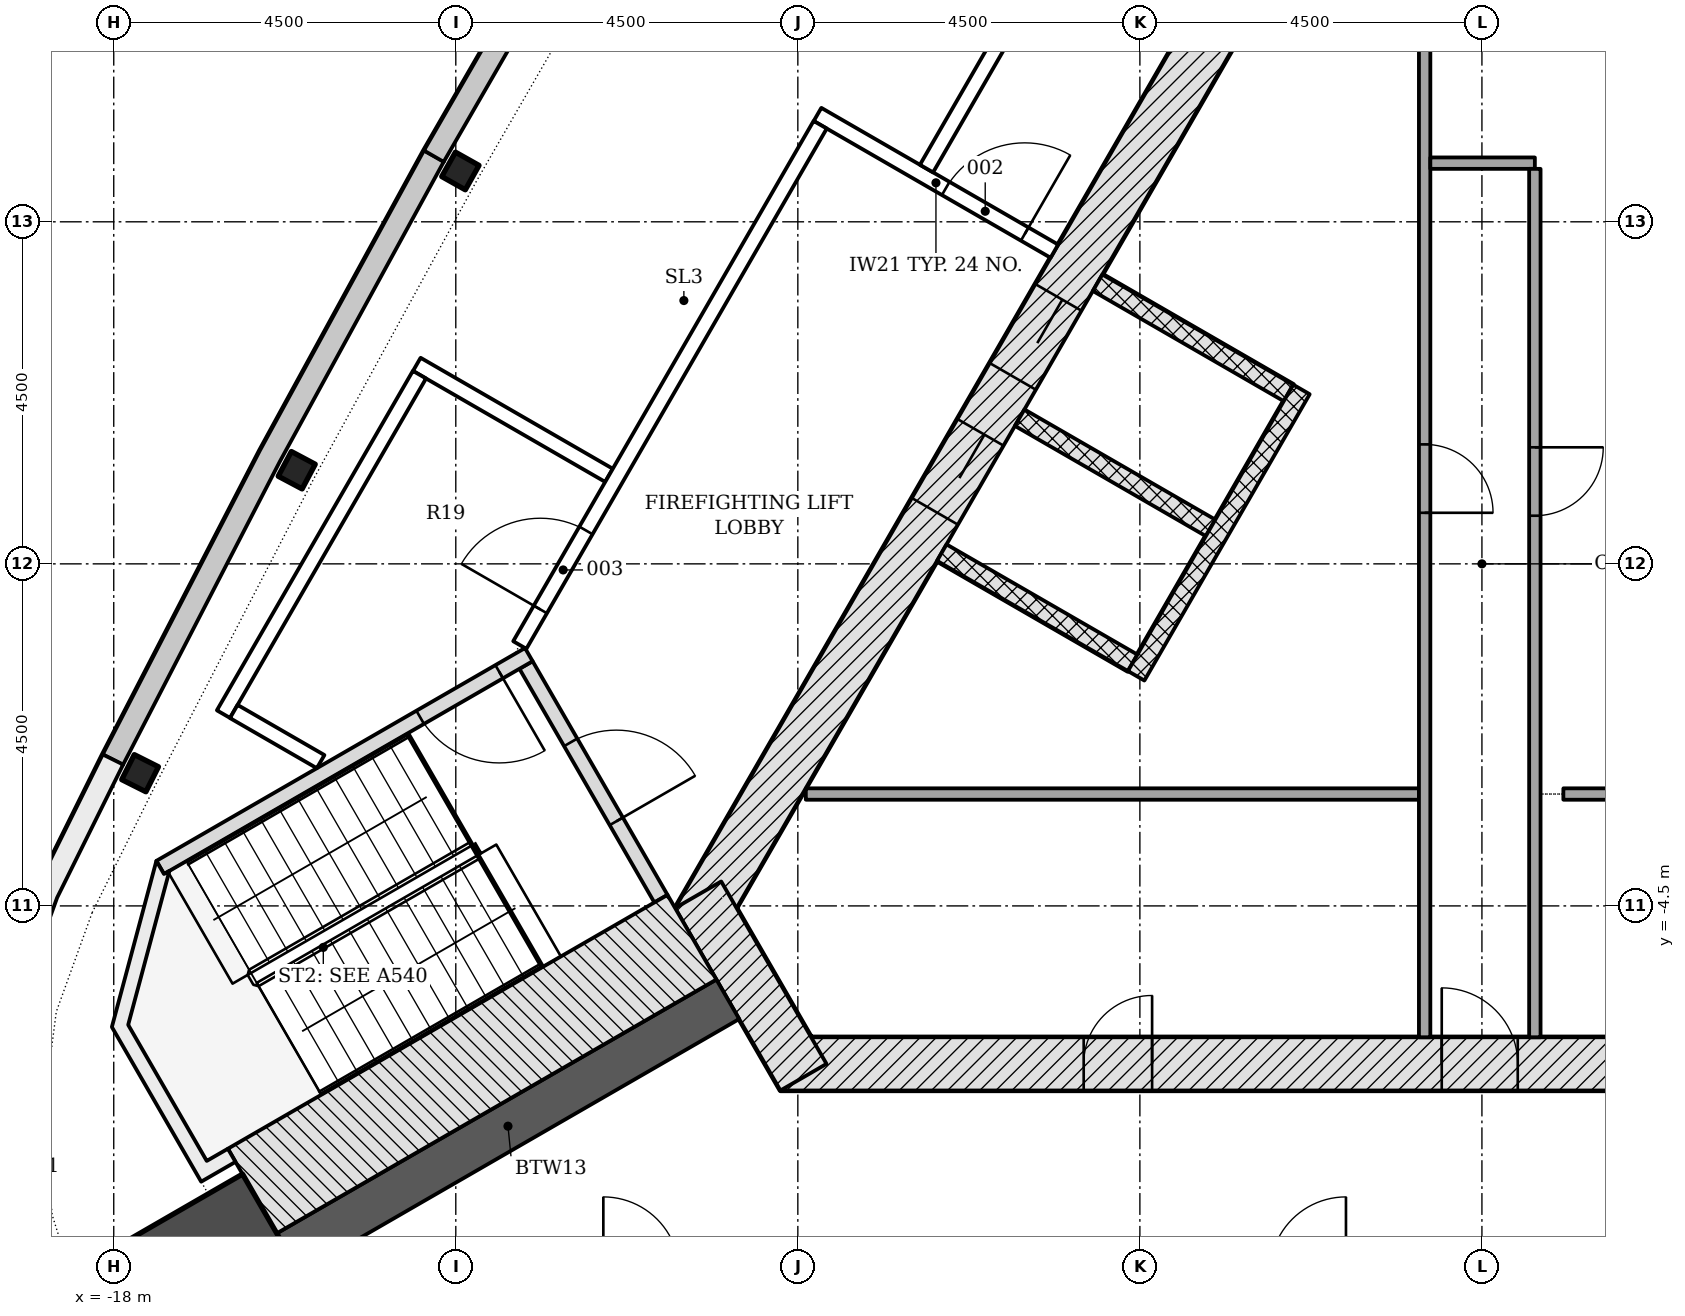
"""IFC4 building model, lengths in metres.
Left out: names, types, materials, properties, quantities, classifications, styles, units other than length and angle.
Written with IfcOpenShell. Run it as: python <this file> out.ifc"""

import sys

from ifc_helpers import new_model, si_unit, direction, frame, frame_2d, origin, origin_2d, place, context, subcontext, project, spatial, polyline, rectangle, i_section, outline, extrude, element, fill, save


model = new_model("IFC4")
c1 = context("Model", 3, precision=1e-05, world=origin(), true_north=direction((0.0, 1.0)))
c2 = subcontext(c1, "Body", "Model", "MODEL_VIEW")
j1 = project(units=[si_unit("LENGTHUNIT", "METRE"), si_unit("PLANEANGLEUNIT", "RADIAN")], contexts=[c1])
p1 = place(None, origin())
s1 = spatial("IfcSite", under=j1, at=p1, CompositionType="ELEMENT")
p2 = place(p1, origin())
s2 = spatial("IfcBuilding", under=s1, at=p2, CompositionType="ELEMENT")
p3 = place(p2, frame((0.0, 0.0, 288.6)))
s3 = spatial("IfcBuildingStorey", under=s2, at=p3, CompositionType="ELEMENT", Elevation=288.6)
p4 = place(p3, frame((-9.229, -6.578, -0.25), z_axis=(0.0, 0.0, 1.0), x_axis=(1.0, 0.0, 0.0)))
e1 = element("IfcWall", 1, at=p4, inside=s3, PredefinedType="SHEAR", context=c2, shape_type="SweptSolid", body=[
    extrude(rectangle(XDim=18.458, YDim=0.7, at=frame_2d((9.229, 0.0))), origin(), (0.0, 0.0, 1.0), 4.5),
])
p5 = place(p4, frame((8.7, 0.0, 0.25)))
e2 = element("IfcOpeningElement", 2, at=p5, cuts=e1, PredefinedType="OPENING", context=c2, shape_type="SweptSolid", body=[
    extrude(rectangle(XDim=1.0, YDim=2.1, at=frame_2d((0.5, 1.05))), frame((0.0, 0.36, 0.0), z_axis=(0.0, -1.0, 0.0), x_axis=(1.0, 0.0, 0.0)), (0.0, 0.0, 1.0), 0.72),
])
p6 = place(p4, frame((3.99, 0.0, 0.25)))
e3 = element("IfcOpeningElement", 3, at=p6, cuts=e1, PredefinedType="OPENING", context=c2, shape_type="SweptSolid", body=[
    extrude(rectangle(XDim=0.9, YDim=2.1, at=frame_2d((0.45, 1.05))), frame((0.0, 0.36, 0.0), z_axis=(0.0, -1.0, 0.0), x_axis=(1.0, 0.0, 0.0)), (0.0, 0.0, 1.0), 0.72),
])
p7 = place(p4, frame((13.539, 0.0, 0.25)))
e4 = element("IfcOpeningElement", 4, at=p7, cuts=e1, PredefinedType="OPENING", context=c2, shape_type="SweptSolid", body=[
    extrude(rectangle(XDim=0.9, YDim=2.1, at=frame_2d((0.45, 1.05))), frame((0.0, 0.36, 0.0), z_axis=(0.0, -1.0, 0.0), x_axis=(1.0, 0.0, 0.0)), (0.0, 0.0, 1.0), 0.72),
])
p8 = place(p3, frame((10.311, -4.703, -0.25), z_axis=(0.0, 0.0, 1.0), x_axis=(-0.500001446645, 0.866024568562, 0.0)))
e5 = element("IfcWall", 5, at=p8, inside=s3, PredefinedType="SHEAR", context=c2, shape_type="SweptSolid", body=[
    extrude(rectangle(XDim=18.458, YDim=0.7, at=frame_2d((9.229, 0.0))), origin(), (0.0, 0.0, 1.0), 4.5),
])
p9 = place(p3, frame((-1.083, 11.281, -0.25), z_axis=(0.0, 0.0, 1.0), x_axis=(-0.500001446645, -0.866024568562, 0.0)))
e6 = element("IfcWall", 6, at=p9, inside=s3, PredefinedType="SHEAR", context=c2, shape_type="SweptSolid", body=[
    extrude(rectangle(XDim=18.458, YDim=0.7, at=frame_2d((9.229, 0.0))), origin(), (0.0, 0.0, 1.0), 4.5),
])
p10 = place(p9, frame((8.979, 0.0, 0.25)))
e7 = element("IfcOpeningElement", 7, at=p10, cuts=e6, PredefinedType="OPENING", context=c2, shape_type="SweptSolid", body=[
    extrude(rectangle(XDim=1.2, YDim=2.1, at=frame_2d((0.6, 1.05))), frame((0.0, 0.36, 0.0), z_axis=(0.0, -1.0, 0.0), x_axis=(1.0, 0.0, 0.0)), (0.0, 0.0, 1.0), 0.72),
])
p11 = place(p9, frame((11.029, 0.0, 0.25)))
e8 = element("IfcOpeningElement", 8, at=p11, cuts=e6, PredefinedType="OPENING", context=c2, shape_type="SweptSolid", body=[
    extrude(rectangle(XDim=1.2, YDim=2.1, at=frame_2d((0.6, 1.05))), frame((0.0, 0.36, 0.0), z_axis=(0.0, -1.0, 0.0), x_axis=(1.0, 0.0, 0.0)), (0.0, 0.0, 1.0), 0.72),
])
p12 = place(p3, frame((-10.311, -4.353, -0.25), z_axis=(0.0, 0.0, 1.0), x_axis=(0.500042739161, -0.866000726912, 0.0)))
e9 = element("IfcWall", 9, at=p12, inside=s3, PredefinedType="SHEAR", context=c2, shape_type="SweptSolid", body=[
    extrude(rectangle(XDim=2.771, YDim=0.7, at=frame_2d((1.386, 0.0))), origin(), (0.0, 0.0, 1.0), 4.5),
])
p13 = place(p3, frame((-9.922, -5.728, -0.25), z_axis=(0.0, 0.0, 1.0), x_axis=(-0.866032176823, -0.499988268569, 0.0)))
e10 = element("IfcWall", 10, at=p13, inside=s3, PredefinedType="SHEAR", context=c2, shape_type="SweptSolid", body=[
    extrude(rectangle(XDim=6.678, YDim=0.6, at=frame_2d((3.339, 0.0))), origin(), (0.0, 0.0, 1.0), 4.5),
])
p14 = place(p3, frame((-16.745, -9.667, -0.25), z_axis=(0.0, 0.0, 1.0), x_axis=(-0.866025403784, -0.5, 0.0)))
e11 = element("IfcColumn", 11, at=p14, inside=s3, PredefinedType="COLUMN", context=c2, shape_type="SweptSolid", body=[
    extrude(rectangle(XDim=2.4, YDim=2.4, at=origin_2d()), origin(), (0.0, 0.0, 1.0), 4.5),
])
for number, where, z_axis, x_axis in (
    (12, (-13.44, 5.169, -0.25), (0.0, 0.0, 1.0), (-0.49, -0.872, 0.0)),
    (13, (-15.593, 1.232, -0.25), (0.0, 0.0, 1.0), (-0.47, -0.883, 0.0)),
    (14, (-17.654, -2.754, -0.25), (0.0, 0.0, 1.0), (-0.449, -0.894, 0.0)),
):
    element("IfcColumn", number, at=place(p3, frame(where, z_axis=z_axis, x_axis=x_axis)), inside=s3, PredefinedType="COLUMN", context=c2, shape_type="SweptSolid", body=[
        extrude(i_section(OverallWidth=0.368, OverallDepth=0.356, WebThickness=0.011, FlangeThickness=0.018, FilletRadius=0.015, at=origin_2d()), origin(), (0.0, 0.0, 1.0), 4.5),
    ])
p15 = place(p3, origin())
e15 = element("IfcWall", 15, at=p15, inside=s3, PredefinedType="NOTDEFINED", context=c2, shape_type="SweptSolid", body=[
    extrude(outline(polyline([(-13.919, 5.438), (-16.078, 1.49), (-18.145, -2.507), (-17.878, -2.645), (-15.813, 1.349), (-13.656, 5.294), (-13.919, 5.438)])), origin(), (0.0, 0.0, 1.0), 4.25),
])
p16 = place(p3, origin())
e16 = element("IfcWall", 16, at=p16, inside=s3, PredefinedType="NOTDEFINED", context=c2, shape_type="SweptSolid", body=[
    extrude(outline(polyline([(-11.669, 9.335), (-13.919, 5.438), (-13.659, 5.288), (-11.409, 9.185), (-11.669, 9.335)])), origin(), (0.0, 0.0, 1.0), 1.2),
])
p17 = place(p3, origin())
e17 = element("IfcWall", 17, at=p17, inside=s3, PredefinedType="NOTDEFINED", context=c2, shape_type="SweptSolid", body=[
    extrude(outline(polyline([(-18.145, -2.507), (-19.021, -4.273), (-19.538, -5.703), (-19.733, -7.21), (-19.599, -8.724), (-19.141, -10.174), (-18.381, -11.49), (-17.355, -12.611), (-16.111, -13.485), (-14.708, -14.069), (-13.211, -14.336), (-11.244, -14.46), (-11.225, -14.161), (-13.176, -14.038), (-14.623, -13.779), (-15.965, -13.22), (-17.156, -12.385), (-18.138, -11.312), (-18.865, -10.052), (-19.303, -8.665), (-19.432, -7.216), (-19.244, -5.774), (-18.745, -4.391), (-17.876, -2.64), (-18.145, -2.507)])), origin(), (0.0, 0.0, 1.0), 4.25),
])
for number, where, z_axis, x_axis in (
    (18, (-5.056, 3.699, -0.25), (0.0, 0.0, 1.0), (0.866, -0.5, 0.0)),
    (19, (-6.081, 1.923, -0.25), (0.0, 0.0, 1.0), (0.866, -0.5, 0.0)),
    (20, (-7.106, 0.148, -0.25), (0.0, 0.0, 1.0), (0.866, -0.5, 0.0)),
):
    element("IfcWall", number, at=place(p3, frame(where, z_axis=z_axis, x_axis=x_axis)), inside=s3, PredefinedType="PARTITIONING", context=c2, shape_type="SweptSolid", body=[
        extrude(rectangle(XDim=2.9, YDim=0.25, at=frame_2d((1.45, 0.0))), origin(), (0.0, 0.0, 1.0), 4.5),
    ])
p18 = place(p3, frame((-2.374, 2.294, 0.0), z_axis=(0.0, 0.0, 1.0), x_axis=(-0.499996127374, -0.866027639635, 0.0)))
e21 = element("IfcWall", 21, at=p18, inside=s3, PredefinedType="PARTITIONING", context=c2, shape_type="SweptSolid", body=[
    extrude(rectangle(XDim=4.35, YDim=0.25, at=frame_2d((2.175, 0.0))), origin(), (0.0, 0.0, 1.0), 4.25),
])
p19 = place(p3, frame((-8.895, -3.028, 0.0), z_axis=(0.0, 0.0, 1.0), x_axis=(1.0, 0.0, 0.0)))
e22 = element("IfcWall", 22, at=p19, inside=s3, PredefinedType="PARTITIONING", context=c2, shape_type="SweptSolid", body=[
    extrude(rectangle(XDim=8.066, YDim=0.15, at=frame_2d((4.033, 0.0))), origin(), (0.0, 0.0, 1.0), 4.25),
])
p20 = place(p3, frame((-0.754, 10.756, 0.0), z_axis=(0.0, 0.0, 1.0), x_axis=(0.0, -1.0, 0.0)))
e23 = element("IfcWall", 23, at=p20, inside=s3, PredefinedType="PARTITIONING", context=c2, shape_type="SweptSolid", body=[
    extrude(rectangle(XDim=16.985, YDim=0.15, at=frame_2d((8.492, 0.0))), origin(), (0.0, 0.0, 1.0), 4.25),
])
p21 = place(p20, frame((9.185, 0.0, 0.0)))
e24 = element("IfcOpeningElement", 24, at=p21, cuts=e23, PredefinedType="OPENING", context=c2, shape_type="SweptSolid", body=[
    extrude(rectangle(XDim=0.9, YDim=2.1, at=frame_2d((0.45, 1.05))), frame((0.0, 0.085, 0.0), z_axis=(0.0, -1.0, 0.0), x_axis=(1.0, 0.0, 0.0)), (0.0, 0.0, 1.0), 0.17),
])
p22 = place(p3, frame((-0.679, 5.272, 0.0), z_axis=(0.0, 0.0, 1.0), x_axis=(1.0, 0.0, 0.0)))
e25 = element("IfcWall", 25, at=p22, inside=s3, PredefinedType="PARTITIONING", context=c2, shape_type="SweptSolid", body=[
    extrude(rectangle(XDim=1.375, YDim=0.15, at=frame_2d((0.688, 0.0))), origin(), (0.0, 0.0, 1.0), 4.25),
])
p23 = place(p3, frame((0.696, 5.197, 0.0), z_axis=(0.0, 0.0, 1.0), x_axis=(0.0, -1.0, 0.0)))
e26 = element("IfcWall", 26, at=p23, inside=s3, PredefinedType="PARTITIONING", context=c2, shape_type="SweptSolid", body=[
    extrude(rectangle(XDim=11.425, YDim=0.15, at=frame_2d((5.712, 0.0))), origin(), (0.0, 0.0, 1.0), 4.25),
])
p24 = place(p23, frame((3.664, 0.0, 0.0)))
e27 = element("IfcOpeningElement", 27, at=p24, cuts=e26, PredefinedType="OPENING", context=c2, shape_type="SweptSolid", body=[
    extrude(rectangle(XDim=0.9, YDim=2.1, at=frame_2d((0.45, 1.05))), frame((0.0, 0.085, 0.0), z_axis=(0.0, -1.0, 0.0), x_axis=(1.0, 0.0, 0.0)), (0.0, 0.0, 1.0), 0.17),
])
p25 = place(p3, frame((1.071, -3.028, 0.0), z_axis=(0.0, 0.0, 1.0), x_axis=(1.0, 0.0, 0.0)))
e28 = element("IfcWall", 28, at=p25, inside=s3, PredefinedType="PARTITIONING", context=c2, shape_type="SweptSolid", body=[
    extrude(rectangle(XDim=7.824, YDim=0.15, at=frame_2d((3.912, 0.0))), origin(), (0.0, 0.0, 1.0), 4.25),
])
p26 = place(p3, frame((-12.576, -1.331, -0.25), z_axis=(0.0, 0.0, 1.0), x_axis=(0.499970499736, -0.8660424351, 0.0)))
e29 = element("IfcWall", 29, at=p26, inside=s3, PredefinedType="SHEAR", context=c2, shape_type="SweptSolid", body=[
    extrude(rectangle(XDim=3.55, YDim=0.2, at=frame_2d((1.775, 0.0))), origin(), (0.0, 0.0, 1.0), 4.5),
])
p27 = place(p26, frame((1.175, 0.0, 0.25)))
e30 = element("IfcOpeningElement", 30, at=p27, cuts=e29, PredefinedType="OPENING", context=c2, shape_type="SweptSolid", body=[
    extrude(rectangle(XDim=1.2, YDim=2.1, at=frame_2d((0.6, 1.05))), frame((0.0, 0.11, 0.0), z_axis=(0.0, -1.0, 0.0), x_axis=(1.0, 0.0, 0.0)), (0.0, 0.0, 1.0), 0.22),
])
p28 = place(p3, frame((-12.539, -1.194, -0.25), z_axis=(0.0, 0.0, 1.0), x_axis=(-0.866045472092, -0.499965239061, 0.0)))
e31 = element("IfcWall", 31, at=p28, inside=s3, PredefinedType="SHEAR", context=c2, shape_type="SweptSolid", body=[
    extrude(rectangle(XDim=5.6, YDim=0.2, at=frame_2d((2.8, 0.0))), origin(), (0.0, 0.0, 1.0), 4.5),
])
p29 = place(p28, frame((0.45, 0.0, 0.25)))
e32 = element("IfcOpeningElement", 32, at=p29, cuts=e31, PredefinedType="OPENING", context=c2, shape_type="SweptSolid", body=[
    extrude(rectangle(XDim=1.2, YDim=2.1, at=frame_2d((0.6, 1.05))), frame((0.0, 0.11, 0.0), z_axis=(0.0, -1.0, 0.0), x_axis=(1.0, 0.0, 0.0)), (0.0, 0.0, 1.0), 0.22),
])
p30 = place(p3, frame((-10.393, -4.912, -0.25), z_axis=(0.0, 0.0, 1.0), x_axis=(-0.866025486527, -0.499999856685, 0.0)))
e33 = element("IfcWall", 33, at=p30, inside=s3, PredefinedType="SHEAR", context=c2, shape_type="SweptSolid", body=[
    extrude(rectangle(XDim=6.679, YDim=1.286, at=frame_2d((3.339, 0.0))), origin(), (0.0, 0.0, 1.0), 4.5),
])
p31 = place(p3, frame((0.0, 0.0, -0.25)))
e34 = element("IfcWall", 34, at=p31, inside=s3, PredefinedType="SHEAR", context=c2, shape_type="SweptSolid", body=[
    extrude(outline(polyline([(-17.439, -3.907), (-18.025, -6.093), (-16.85, -8.128), (-16.398, -7.867), (-16.498, -7.694), (-16.498, -7.694), (-16.777, -7.855), (-17.81, -6.065), (-17.267, -4.039), (-17.339, -4.081), (-17.339, -4.081), (-17.339, -4.081), (-17.339, -4.081), (-17.339, -4.081), (-17.339, -4.081), (-17.339, -4.081), (-17.339, -4.081), (-17.339, -4.081), (-17.339, -4.081), (-17.339, -4.081), (-17.339, -4.081), (-17.339, -4.081), (-17.339, -4.081), (-17.339, -4.081), (-17.339, -4.081), (-17.339, -4.081), (-17.439, -3.907)])), origin(), (0.0, 0.0, 1.0), 4.5),
])
p32 = place(p3, frame((-8.741, 5.913, 0.0), z_axis=(0.0, 0.0, 1.0), x_axis=(0.866017220491, -0.500014173611, 0.0)))
e35 = element("IfcWall", 35, at=p32, inside=s3, PredefinedType="PARTITIONING", context=c2, shape_type="SweptSolid", body=[
    extrude(rectangle(XDim=3.598, YDim=0.2, at=frame_2d((1.799, 0.0))), origin(), (0.0, 0.0, 1.0), 4.25),
])
p33 = place(p32, frame((1.948, 0.0, 0.0)))
e36 = element("IfcOpeningElement", 36, at=p33, cuts=e35, PredefinedType="OPENING", context=c2, shape_type="SweptSolid", body=[
    extrude(rectangle(XDim=1.2, YDim=2.1, at=frame_2d((0.6, 1.05))), frame((0.0, 0.11, 0.0), z_axis=(0.0, -1.0, 0.0), x_axis=(1.0, 0.0, 0.0)), (0.0, 0.0, 1.0), 0.22),
])
p34 = place(p3, frame((-14.013, 2.625, 0.0), z_axis=(0.0, 0.0, 1.0), x_axis=(0.866026830048, -0.499997529631, 0.0)))
e37 = element("IfcWall", 37, at=p34, inside=s3, PredefinedType="PARTITIONING", context=c2, shape_type="SweptSolid", body=[
    extrude(rectangle(XDim=2.919, YDim=0.2, at=frame_2d((1.46, 0.0))), origin(), (0.0, 0.0, 1.0), 4.25),
])
p35 = place(p3, frame((-12.658, -1.068, 0.0), z_axis=(0.0, 0.0, 1.0), x_axis=(0.499996073327, 0.866027670838, 0.0)))
e38 = element("IfcWall", 38, at=p35, inside=s3, PredefinedType="PARTITIONING", context=c2, shape_type="SweptSolid", body=[
    extrude(rectangle(XDim=7.904, YDim=0.2, at=frame_2d((3.952, 0.0))), origin(), (0.0, 0.0, 1.0), 3.702),
])
p36 = place(p35, frame((0.541, 0.0, 0.0)))
e39 = element("IfcOpeningElement", 39, at=p36, cuts=e38, PredefinedType="OPENING", context=c2, shape_type="SweptSolid", body=[
    extrude(rectangle(XDim=1.2, YDim=2.1, at=frame_2d((0.6, 1.05))), frame((0.0, 0.11, 0.0), z_axis=(0.0, -1.0, 0.0), x_axis=(1.0, 0.0, 0.0)), (0.0, 0.0, 1.0), 0.22),
])
p37 = place(p3, frame((-7.307, 5.2, 0.0), z_axis=(0.0, 0.0, 1.0), x_axis=(0.49999780173, 0.866026672953, 0.0)))
e40 = element("IfcWall", 40, at=p37, inside=s3, PredefinedType="PARTITIONING", context=c2, shape_type="SweptSolid", body=[
    extrude(rectangle(XDim=13.841, YDim=0.2, at=frame_2d((6.92, 0.0))), origin(), (0.0, 0.0, 1.0), 3.702),
])
p38 = place(p37, frame((6.454, 0.0, 0.0)))
e41 = element("IfcOpeningElement", 41, at=p38, cuts=e40, PredefinedType="OPENING", context=c2, shape_type="SweptSolid", body=[
    extrude(rectangle(XDim=1.0, YDim=2.1, at=frame_2d((0.5, 1.05))), frame((0.0, 0.11, 0.0), z_axis=(0.0, -1.0, 0.0), x_axis=(1.0, 0.0, 0.0)), (0.0, 0.0, 1.0), 0.22),
])
p39 = place(p3, frame((-16.556, -1.977, 0.0), z_axis=(0.0, 0.0, 1.0), x_axis=(0.499983365876, 0.866035007288, 0.0)))
e42 = element("IfcWall", 42, at=p39, inside=s3, PredefinedType="PARTITIONING", context=c2, shape_type="SweptSolid", body=[
    extrude(rectangle(XDim=5.157, YDim=0.2, at=frame_2d((2.579, 0.0))), origin(), (0.0, 0.0, 1.0), 3.702),
])
p40 = place(p3, frame((-16.421, -1.942, 0.0), z_axis=(0.0, 0.0, 1.0), x_axis=(0.865991484893, -0.500058744641, 0.0)))
e43 = element("IfcWall", 43, at=p40, inside=s3, PredefinedType="PARTITIONING", context=c2, shape_type="SweptSolid", body=[
    extrude(rectangle(XDim=1.32, YDim=0.2, at=frame_2d((0.66, 0.0))), origin(), (0.0, 0.0, 1.0), 4.25),
])
p41 = place(p10, origin())
e44 = element("IfcDoor", 44, at=p41, inside=s3, OperationType="DOUBLE_DOOR_SLIDING", PredefinedType="DOOR", context=c2, shape_type="SweptSolid", body=[
    extrude(rectangle(XDim=1.2, YDim=2.1, at=frame_2d((0.6, 1.05))), frame((0.0, 0.025, 0.0), z_axis=(0.0, -1.0, 0.0), x_axis=(1.0, 0.0, 0.0)), (0.0, 0.0, 1.0), 0.05),
])
fill(e7, e44)
p42 = place(p11, origin())
e45 = element("IfcDoor", 45, at=p42, inside=s3, OperationType="DOUBLE_DOOR_SLIDING", PredefinedType="DOOR", context=c2, shape_type="SweptSolid", body=[
    extrude(rectangle(XDim=1.2, YDim=2.1, at=frame_2d((0.6, 1.05))), frame((0.0, 0.025, 0.0), z_axis=(0.0, -1.0, 0.0), x_axis=(1.0, 0.0, 0.0)), (0.0, 0.0, 1.0), 0.05),
])
fill(e8, e45)
p43 = place(p5, origin())
e46 = element("IfcDoor", 46, at=p43, inside=s3, OperationType="SINGLE_SWING_LEFT", PredefinedType="DOOR", context=c2, shape_type="SweptSolid", body=[
    extrude(rectangle(XDim=1.0, YDim=2.1, at=frame_2d((0.5, 1.05))), frame((0.0, 0.075, 0.0), z_axis=(0.0, -1.0, 0.0), x_axis=(1.0, 0.0, 0.0)), (0.0, 0.0, 1.0), 0.15),
])
fill(e2, e46)
p44 = place(p6, origin())
e47 = element("IfcDoor", 47, at=p44, inside=s3, OperationType="SINGLE_SWING_RIGHT", PredefinedType="DOOR", context=c2, shape_type="SweptSolid", body=[
    extrude(rectangle(XDim=0.9, YDim=2.1, at=frame_2d((0.45, 1.05))), frame((0.0, 0.075, 0.0), z_axis=(0.0, -1.0, 0.0), x_axis=(1.0, 0.0, 0.0)), (0.0, 0.0, 1.0), 0.15),
])
fill(e3, e47)
p45 = place(p21, origin())
e48 = element("IfcDoor", 48, at=p45, inside=s3, OperationType="SINGLE_SWING_RIGHT", PredefinedType="DOOR", context=c2, shape_type="SweptSolid", body=[
    extrude(rectangle(XDim=0.9, YDim=2.1, at=frame_2d((0.45, 1.05))), frame((0.0, 0.025, 0.0), z_axis=(0.0, -1.0, 0.0), x_axis=(1.0, 0.0, 0.0)), (0.0, 0.0, 1.0), 0.05),
])
fill(e24, e48)
p46 = place(p24, origin())
e49 = element("IfcDoor", 49, at=p46, inside=s3, OperationType="SINGLE_SWING_LEFT", PredefinedType="DOOR", context=c2, shape_type="SweptSolid", body=[
    extrude(rectangle(XDim=0.9, YDim=2.1, at=frame_2d((0.45, 1.05))), frame((0.0, 0.025, 0.0), z_axis=(0.0, -1.0, 0.0), x_axis=(1.0, 0.0, 0.0)), (0.0, 0.0, 1.0), 0.05),
])
fill(e27, e49)
p47 = place(p27, origin())
e50 = element("IfcDoor", 50, at=p47, inside=s3, OperationType="SINGLE_SWING_RIGHT", PredefinedType="DOOR", context=c2, shape_type="SweptSolid", body=[
    extrude(rectangle(XDim=1.2, YDim=2.1, at=frame_2d((0.6, 1.05))), frame((0.0, 0.025, 0.0), z_axis=(0.0, -1.0, 0.0), x_axis=(1.0, 0.0, 0.0)), (0.0, 0.0, 1.0), 0.05),
])
fill(e30, e50)
p48 = place(p29, origin())
e51 = element("IfcDoor", 51, at=p48, inside=s3, OperationType="SINGLE_SWING_LEFT", PredefinedType="DOOR", context=c2, shape_type="SweptSolid", body=[
    extrude(rectangle(XDim=1.2, YDim=2.1, at=frame_2d((0.6, 1.05))), frame((0.0, 0.025, 0.0), z_axis=(0.0, -1.0, 0.0), x_axis=(1.0, 0.0, 0.0)), (0.0, 0.0, 1.0), 0.05),
])
fill(e32, e51)
p49 = place(p33, origin())
e52 = element("IfcDoor", 52, at=p49, inside=s3, OperationType="SINGLE_SWING_RIGHT", PredefinedType="DOOR", context=c2, shape_type="SweptSolid", body=[
    extrude(rectangle(XDim=1.2, YDim=2.1, at=frame_2d((0.6, 1.05))), frame((0.0, 0.025, 0.0), z_axis=(0.0, -1.0, 0.0), x_axis=(1.0, 0.0, 0.0)), (0.0, 0.0, 1.0), 0.05),
])
fill(e36, e52)
p50 = place(p36, origin())
e53 = element("IfcDoor", 53, at=p50, inside=s3, OperationType="SINGLE_SWING_LEFT", PredefinedType="DOOR", context=c2, shape_type="SweptSolid", body=[
    extrude(rectangle(XDim=1.2, YDim=2.1, at=frame_2d((0.6, 1.05))), frame((0.0, 0.025, 0.0), z_axis=(0.0, -1.0, 0.0), x_axis=(1.0, 0.0, 0.0)), (0.0, 0.0, 1.0), 0.05),
])
fill(e39, e53)
save(model, sys.argv[1])
